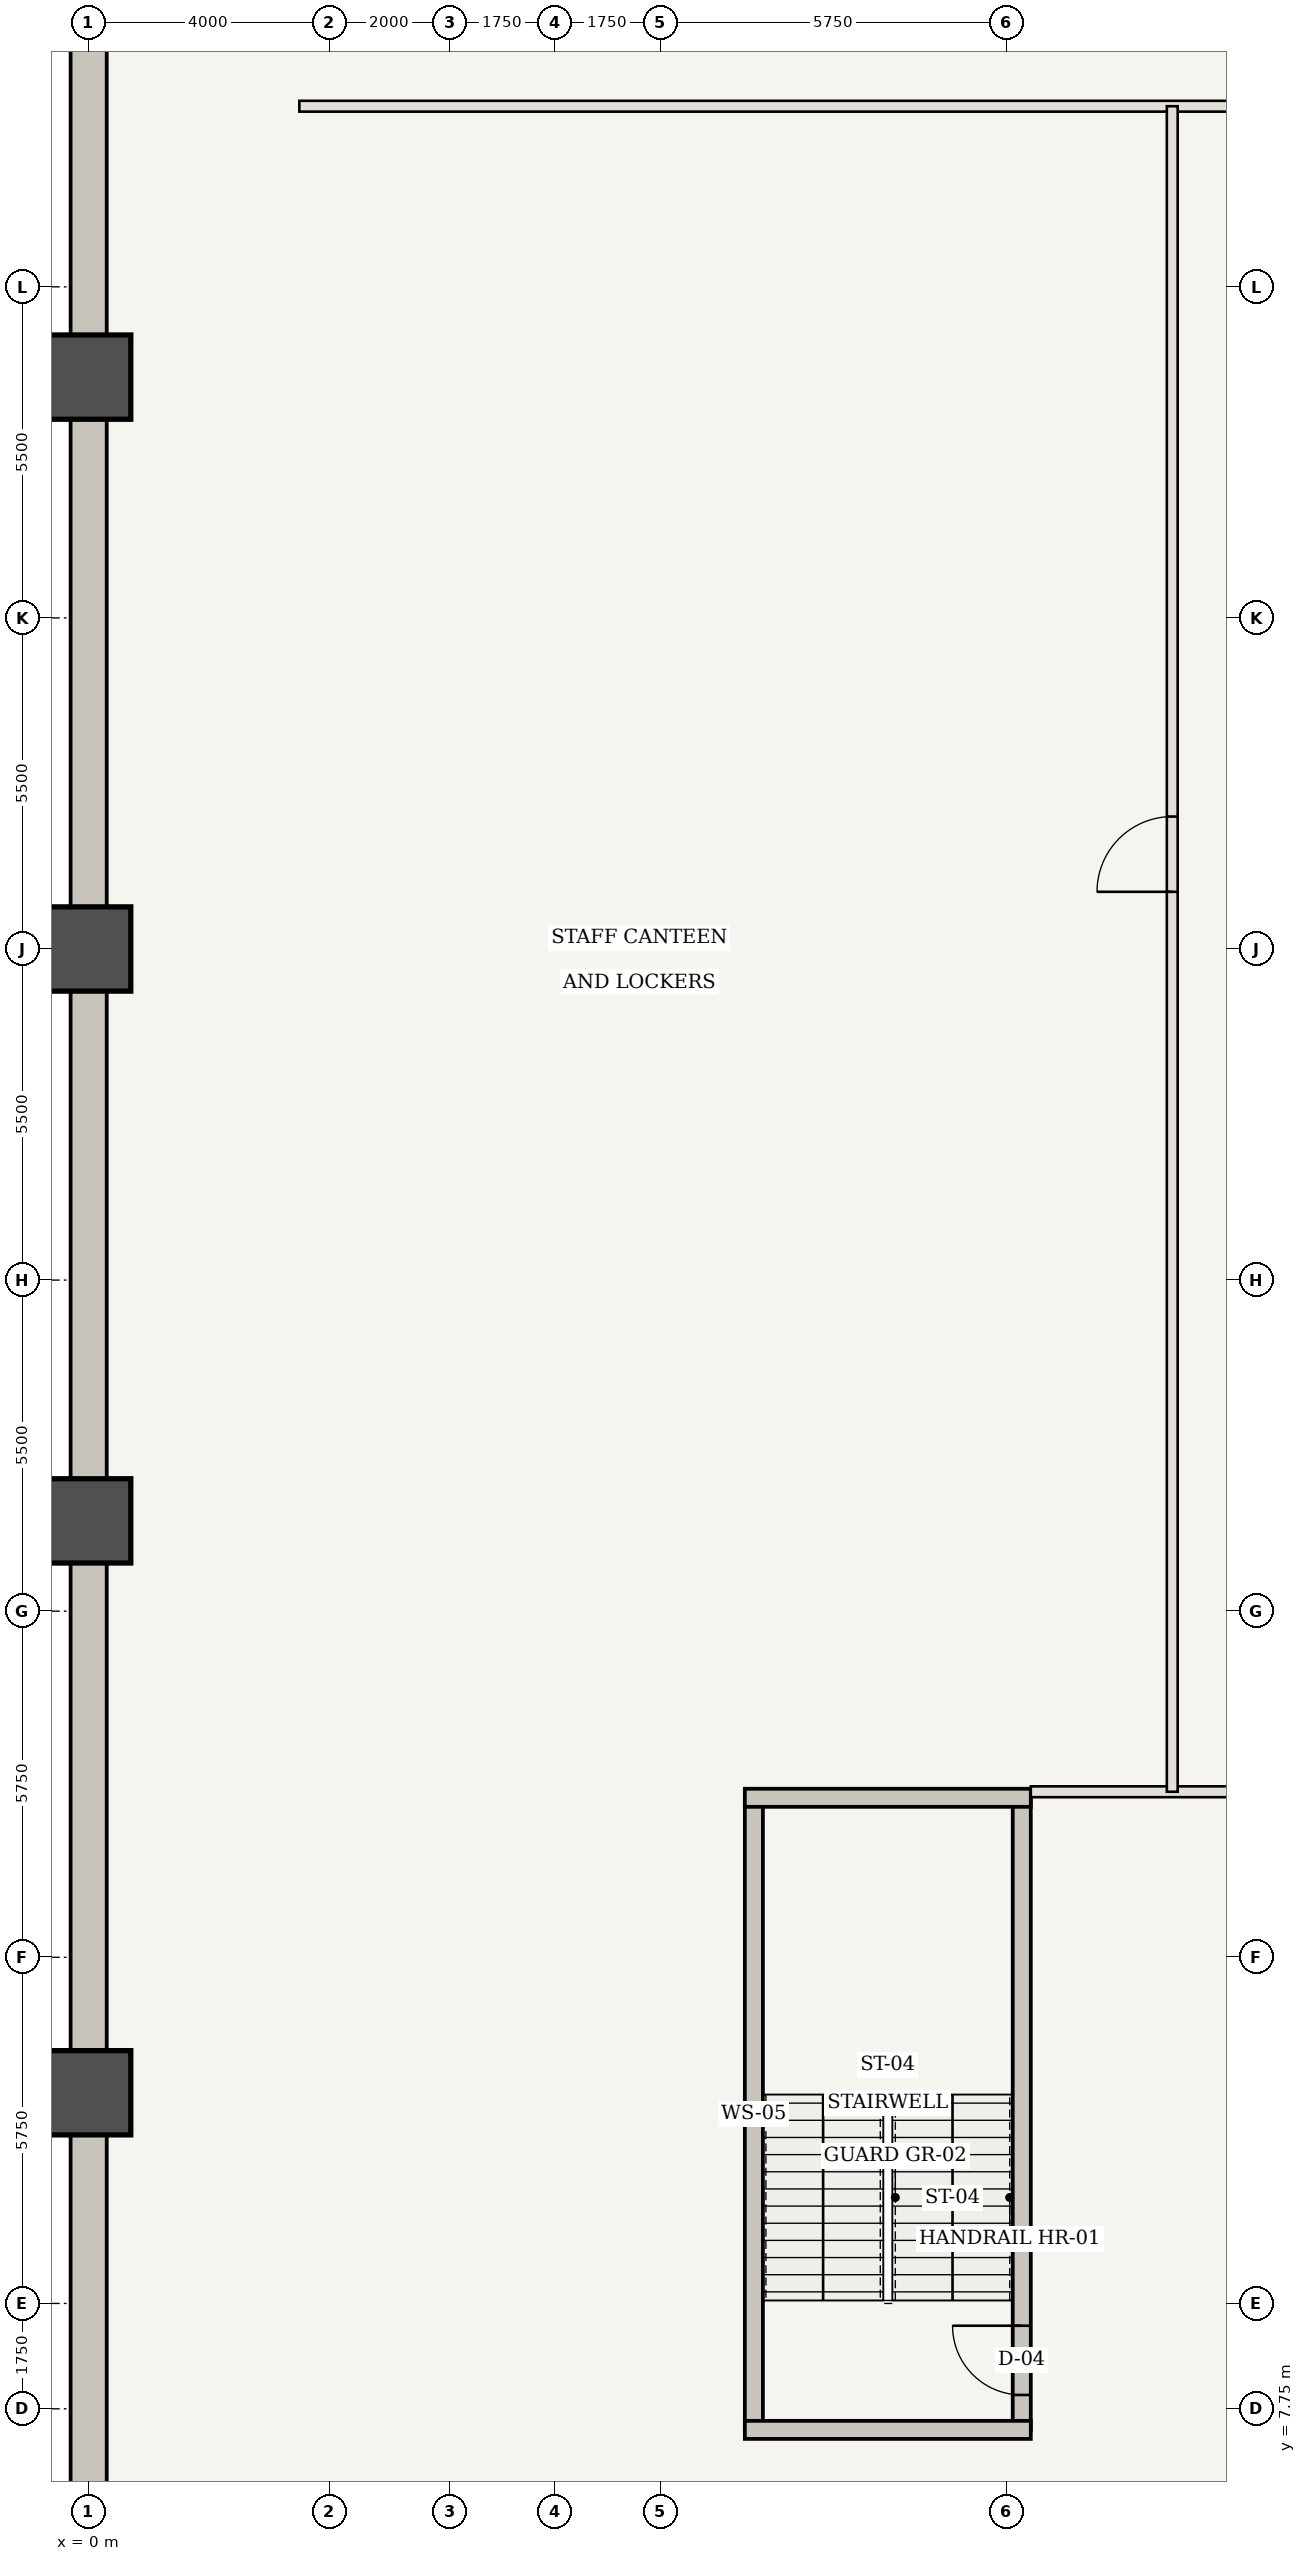
"""IFC4 building model, lengths in metres.
Left out: names, types, materials, properties, quantities, classifications, styles, units other than length and angle.
Written with IfcOpenShell. Run it as: python <this file> out.ifc"""

import sys

from ifc_helpers import new_model, si_unit, direction, frame, frame_2d, origin, origin_2d, place, context, subcontext, project, spatial, rectangle, extrude, element, fill, save


model = new_model("IFC4")
c1 = context("Model", 3, precision=1e-05, world=origin(), true_north=direction((0.0, 1.0)))
c2 = subcontext(c1, "Body", "Model", "MODEL_VIEW")
j1 = project(units=[si_unit("LENGTHUNIT", "METRE"), si_unit("PLANEANGLEUNIT", "RADIAN")], contexts=[c1])
p1 = place(None, origin())
s1 = spatial("IfcSite", under=j1, at=p1, CompositionType="ELEMENT")
p2 = place(p1, origin())
s2 = spatial("IfcBuilding", under=s1, at=p2, CompositionType="ELEMENT")
p3 = place(p2, frame((0.0, 0.0, -4.55)))
s3 = spatial("IfcBuildingStorey", under=s2, at=p3, CompositionType="ELEMENT", Elevation=-4.55)
p4 = place(p3, frame((0.0, 60.5, 0.0), z_axis=(0.0, 0.0, 1.0), x_axis=(0.0, -1.0, 0.0)))
e1 = element("IfcWall", 1, at=p4, inside=s3, PredefinedType="USERDEFINED", context=c2, shape_type="SweptSolid", body=[
    extrude(rectangle(XDim=57.0, YDim=0.6, at=frame_2d((28.5, 0.0))), origin(), (0.0, 0.0, 1.0), 4.55),
])
for number, where, z_axis, x_axis in (
    (2, (0.0, 13.0, 0.0), (0.0, 0.0, 1.0), (1.0, 0.0, 0.0)),
    (3, (0.0, 22.5, 0.0), (0.0, 0.0, 1.0), (1.0, 0.0, 0.0)),
    (4, (0.0, 32.0, 0.0), (0.0, 0.0, 1.0), (1.0, 0.0, 0.0)),
    (5, (0.0, 41.5, 0.0), (0.0, 0.0, 1.0), (1.0, 0.0, 0.0)),
):
    element("IfcColumn", number, at=place(p3, frame(where, z_axis=z_axis, x_axis=x_axis)), inside=s3, PredefinedType="COLUMN", context=c2, shape_type="SweptSolid", body=[
        extrude(rectangle(XDim=1.4, YDim=1.4, at=origin_2d()), origin(), (0.0, 0.0, 1.0), 4.55),
    ])
p5 = place(p3, frame((11.05, 7.4, 0.0), z_axis=(0.0, 0.0, 1.0), x_axis=(0.0, 1.0, 0.0)))
e6 = element("IfcWall", 6, at=p5, inside=s3, PredefinedType="SHEAR", context=c2, shape_type="SweptSolid", body=[
    extrude(rectangle(XDim=10.5, YDim=0.3, at=frame_2d((5.25, 0.0))), origin(), (0.0, 0.0, 1.0), 4.23),
])
p6 = place(p3, frame((15.5, 7.4, 0.0), z_axis=(0.0, 0.0, 1.0), x_axis=(0.0, 1.0, 0.0)))
e7 = element("IfcWall", 7, at=p6, inside=s3, PredefinedType="SHEAR", context=c2, shape_type="SweptSolid", body=[
    extrude(rectangle(XDim=10.5, YDim=0.3, at=frame_2d((5.25, 0.0))), origin(), (0.0, 0.0, 1.0), 4.23),
])
p7 = place(p6, frame((0.58, 0.0, 0.0)))
e8 = element("IfcOpeningElement", 8, at=p7, cuts=e7, PredefinedType="OPENING", context=c2, shape_type="SweptSolid", body=[
    extrude(rectangle(XDim=1.15, YDim=2.15, at=frame_2d((0.575, 1.075))), frame((0.0, 0.16, 0.0), z_axis=(0.0, -1.0, 0.0), x_axis=(1.0, 0.0, 0.0)), (0.0, 0.0, 1.0), 0.32),
])
for number, where, z_axis, x_axis in (
    (9, (10.9, 7.4, 0.0), (0.0, 0.0, 1.0), (1.0, 0.0, 0.0)),
    (10, (10.9, 17.9, 0.0), (0.0, 0.0, 1.0), (1.0, 0.0, 0.0)),
):
    element("IfcWall", number, at=place(p3, frame(where, z_axis=z_axis, x_axis=x_axis)), inside=s3, PredefinedType="SHEAR", context=c2, shape_type="SweptSolid", body=[
        extrude(rectangle(XDim=4.75, YDim=0.3, at=frame_2d((2.375, 0.0))), origin(), (0.0, 0.0, 1.0), 4.23),
    ])
p8 = place(p3, frame((15.65, 18.0, 0.0), z_axis=(0.0, 0.0, 1.0), x_axis=(1.0, 0.0, 0.0)))
e11 = element("IfcWall", 11, at=p8, inside=s3, PredefinedType="STANDARD", context=c2, shape_type="SweptSolid", body=[
    extrude(rectangle(XDim=22.35, YDim=0.18, at=frame_2d((11.175, 0.0))), origin(), (0.0, 0.0, 1.0), 4.23),
])
p9 = place(p8, frame((4.5, 0.0, 0.0)))
e12 = element("IfcOpeningElement", 12, at=p9, cuts=e11, PredefinedType="OPENING", context=c2, shape_type="SweptSolid", body=[
    extrude(rectangle(XDim=1.25, YDim=2.2, at=frame_2d((0.625, 1.1))), frame((0.0, 0.1, 0.0), z_axis=(0.0, -1.0, 0.0), x_axis=(1.0, 0.0, 0.0)), (0.0, 0.0, 1.0), 0.2),
])
p10 = place(p3, frame((3.5, 46.0, 0.0), z_axis=(0.0, 0.0, 1.0), x_axis=(1.0, 0.0, 0.0)))
e13 = element("IfcWall", 13, at=p10, inside=s3, PredefinedType="STANDARD", context=c2, shape_type="SweptSolid", body=[
    extrude(rectangle(XDim=22.5, YDim=0.18, at=frame_2d((11.25, 0.0))), origin(), (0.0, 0.0, 1.0), 4.23),
])
p11 = place(p10, frame((20.4, 0.0, 0.0)))
e14 = element("IfcOpeningElement", 14, at=p11, cuts=e13, PredefinedType="OPENING", context=c2, shape_type="SweptSolid", body=[
    extrude(rectangle(XDim=1.25, YDim=2.2, at=frame_2d((0.625, 1.1))), frame((0.0, 0.1, 0.0), z_axis=(0.0, -1.0, 0.0), x_axis=(1.0, 0.0, 0.0)), (0.0, 0.0, 1.0), 0.2),
])
p12 = place(p3, frame((18.0, 18.0, 0.0), z_axis=(0.0, 0.0, 1.0), x_axis=(0.0, 1.0, 0.0)))
e15 = element("IfcWall", 15, at=p12, inside=s3, PredefinedType="STANDARD", context=c2, shape_type="SweptSolid", body=[
    extrude(rectangle(XDim=28.0, YDim=0.18, at=frame_2d((14.0, 0.0))), origin(), (0.0, 0.0, 1.0), 4.23),
])
p13 = place(p12, frame((14.95, 0.0, 0.0)))
e16 = element("IfcOpeningElement", 16, at=p13, cuts=e15, PredefinedType="OPENING", context=c2, shape_type="SweptSolid", body=[
    extrude(rectangle(XDim=1.25, YDim=2.2, at=frame_2d((0.625, 1.1))), frame((0.0, 0.1, 0.0), z_axis=(0.0, -1.0, 0.0), x_axis=(1.0, 0.0, 0.0)), (0.0, 0.0, 1.0), 0.2),
])
p14 = place(p7, origin())
e17 = element("IfcDoor", 17, at=p14, inside=s3, OperationType="SINGLE_SWING_RIGHT", PredefinedType="DOOR", context=c2, shape_type="SweptSolid", body=[
    extrude(rectangle(XDim=1.15, YDim=2.15, at=frame_2d((0.575, 1.075))), frame((0.0, 0.025, 0.0), z_axis=(0.0, -1.0, 0.0), x_axis=(1.0, 0.0, 0.0)), (0.0, 0.0, 1.0), 0.05),
])
fill(e8, e17)
p15 = place(p13, origin())
e18 = element("IfcDoor", 18, at=p15, inside=s3, OperationType="SINGLE_SWING_LEFT", PredefinedType="DOOR", context=c2, shape_type="SweptSolid", body=[
    extrude(rectangle(XDim=1.25, YDim=2.2, at=frame_2d((0.625, 1.1))), frame((0.0, 0.025, 0.0), z_axis=(0.0, -1.0, 0.0), x_axis=(1.0, 0.0, 0.0)), (0.0, 0.0, 1.0), 0.05),
])
fill(e16, e18)
save(model, sys.argv[1])
